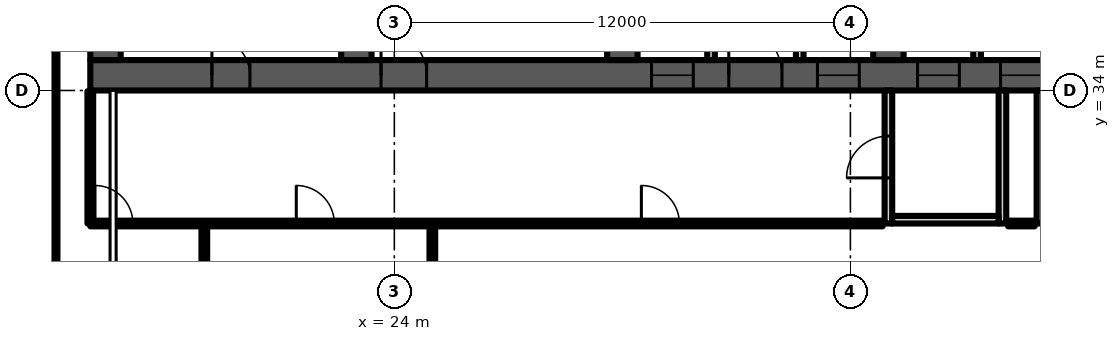
"""IFC4 building model, lengths in metres.
Left out: names, types, materials, properties, quantities, classifications, styles, units other than length and angle.
Written with IfcOpenShell. Run it as: python <this file> out.ifc"""

import sys

from ifc_helpers import new_model, si_unit, direction, frame, frame_2d, origin, place, context, subcontext, project, spatial, polyline, rectangle, outline, extrude, element, fill, save


model = new_model("IFC4")
c1 = context("Model", 3, precision=1e-05, world=origin(), true_north=direction((0.0, 1.0)))
c2 = subcontext(c1, "Body", "Model", "MODEL_VIEW")
j1 = project(units=[si_unit("LENGTHUNIT", "METRE"), si_unit("PLANEANGLEUNIT", "RADIAN")], contexts=[c1])
p1 = place(None, origin())
s1 = spatial("IfcSite", under=j1, at=p1, CompositionType="ELEMENT")
p2 = place(p1, origin())
s2 = spatial("IfcBuilding", under=s1, at=p2, CompositionType="ELEMENT")
p3 = place(p2, frame((0.0, 0.0, 202.3)))
s3 = spatial("IfcBuildingStorey", under=s2, at=p3, CompositionType="ELEMENT", Elevation=202.3)
p4 = place(p3, frame((16.0, 34.4, 0.0), z_axis=(0.0, 0.0, 1.0), x_axis=(1.0, 0.0, 0.0)))
e1 = element("IfcWall", 1, at=p4, inside=s3, PredefinedType="SHEAR", context=c2, shape_type="SweptSolid", body=[
    extrude(rectangle(XDim=42.0, YDim=0.8, at=frame_2d((21.0, 0.0))), origin(), (0.0, 0.0, 1.0), 4.8),
])
p5 = place(p4, frame((3.2, 0.0, 0.0)))
e2 = element("IfcOpeningElement", 2, at=p5, cuts=e1, PredefinedType="OPENING", context=c2, shape_type="SweptSolid", body=[
    extrude(rectangle(XDim=1.0, YDim=2.1, at=frame_2d((0.5, 1.05))), frame((0.0, 0.41, 0.0), z_axis=(0.0, -1.0, 0.0), x_axis=(1.0, 0.0, 0.0)), (0.0, 0.0, 1.0), 0.82),
])
p6 = place(p4, frame((7.65, 0.0, 0.0)))
e3 = element("IfcOpeningElement", 3, at=p6, cuts=e1, PredefinedType="OPENING", context=c2, shape_type="SweptSolid", body=[
    extrude(rectangle(XDim=1.2, YDim=2.1, at=frame_2d((0.6, 1.05))), frame((0.0, 0.41, 0.0), z_axis=(0.0, -1.0, 0.0), x_axis=(1.0, 0.0, 0.0)), (0.0, 0.0, 1.0), 0.82),
])
p7 = place(p4, frame((14.767, 0.0, 0.0)))
e4 = element("IfcOpeningElement", 4, at=p7, cuts=e1, PredefinedType="OPENING", context=c2, shape_type="SweptSolid", body=[
    extrude(rectangle(XDim=1.1, YDim=2.1, at=frame_2d((0.55, 1.05))), frame((0.0, 0.41, 0.0), z_axis=(0.0, -1.0, 0.0), x_axis=(1.0, 0.0, 0.0)), (0.0, 0.0, 1.0), 0.82),
])
p8 = place(p4, frame((19.133, 0.0, 0.0)))
e5 = element("IfcOpeningElement", 5, at=p8, cuts=e1, PredefinedType="OPENING", context=c2, shape_type="SweptSolid", body=[
    extrude(rectangle(XDim=1.1, YDim=2.1, at=frame_2d((0.55, 1.05))), frame((0.0, 0.41, 0.0), z_axis=(0.0, -1.0, 0.0), x_axis=(1.0, 0.0, 0.0)), (0.0, 0.0, 1.0), 0.82),
])
p9 = place(p4, frame((16.8, 0.0, 0.0)))
e6 = element("IfcOpeningElement", 6, at=p9, cuts=e1, PredefinedType="OPENING", context=c2, shape_type="SweptSolid", body=[
    extrude(rectangle(XDim=1.4, YDim=2.1, at=frame_2d((0.7, 1.05))), frame((0.0, 0.41, 0.0), z_axis=(0.0, -1.0, 0.0), x_axis=(1.0, 0.0, 0.0)), (0.0, 0.0, 1.0), 0.82),
])
p10 = place(p4, frame((21.767, 0.0, 0.0)))
e7 = element("IfcOpeningElement", 7, at=p10, cuts=e1, PredefinedType="OPENING", context=c2, shape_type="SweptSolid", body=[
    extrude(rectangle(XDim=1.1, YDim=2.1, at=frame_2d((0.55, 1.05))), frame((0.0, 0.41, 0.0), z_axis=(0.0, -1.0, 0.0), x_axis=(1.0, 0.0, 0.0)), (0.0, 0.0, 1.0), 0.82),
])
p11 = place(p4, frame((23.95, 0.0, 0.0)))
e8 = element("IfcOpeningElement", 8, at=p11, cuts=e1, PredefinedType="OPENING", context=c2, shape_type="SweptSolid", body=[
    extrude(rectangle(XDim=1.1, YDim=2.1, at=frame_2d((0.55, 1.05))), frame((0.0, 0.41, 0.0), z_axis=(0.0, -1.0, 0.0), x_axis=(1.0, 0.0, 0.0)), (0.0, 0.0, 1.0), 0.82),
])
p12 = place(p4, frame((26.133, 0.0, 0.0)))
e9 = element("IfcOpeningElement", 9, at=p12, cuts=e1, PredefinedType="OPENING", context=c2, shape_type="SweptSolid", body=[
    extrude(rectangle(XDim=1.1, YDim=2.1, at=frame_2d((0.55, 1.05))), frame((0.0, 0.41, 0.0), z_axis=(0.0, -1.0, 0.0), x_axis=(1.0, 0.0, 0.0)), (0.0, 0.0, 1.0), 0.82),
])
p13 = place(p4, frame((33.15, 0.0, 0.0)))
e10 = element("IfcOpeningElement", 10, at=p13, cuts=e1, PredefinedType="OPENING", context=c2, shape_type="SweptSolid", body=[
    extrude(rectangle(XDim=1.2, YDim=2.1, at=frame_2d((0.6, 1.05))), frame((0.0, 0.41, 0.0), z_axis=(0.0, -1.0, 0.0), x_axis=(1.0, 0.0, 0.0)), (0.0, 0.0, 1.0), 0.82),
])
p14 = place(p4, frame((37.767, 0.0, 0.0)))
e11 = element("IfcOpeningElement", 11, at=p14, cuts=e1, PredefinedType="OPENING", context=c2, shape_type="SweptSolid", body=[
    extrude(rectangle(XDim=1.4, YDim=2.1, at=frame_2d((0.7, 1.05))), frame((0.0, 0.41, 0.0), z_axis=(0.0, -1.0, 0.0), x_axis=(1.0, 0.0, 0.0)), (0.0, 0.0, 1.0), 0.82),
])
p15 = place(p3, frame((16.4, 34.8, 0.0), z_axis=(0.0, 0.0, 1.0), x_axis=(0.0, 1.0, 0.0)))
e12 = element("IfcWall", 12, at=p15, inside=s3, PredefinedType="SHEAR", context=c2, shape_type="SweptSolid", body=[
    extrude(rectangle(XDim=13.184, YDim=0.8, at=frame_2d((6.592, 0.0))), origin(), (0.0, 0.0, 1.0), 4.8),
])
p16 = place(p3, frame((23.0, 34.8, 0.0), z_axis=(0.0, 0.0, 1.0), x_axis=(0.0, 1.0, 0.0)))
e13 = element("IfcWall", 13, at=p16, inside=s3, PredefinedType="SHEAR", context=c2, shape_type="SweptSolid", body=[
    extrude(rectangle(XDim=13.762, YDim=0.8, at=frame_2d((6.881, 0.0))), origin(), (0.0, 0.0, 1.0), 4.8),
])
p17 = place(p16, frame((2.55, 0.0, 0.0)))
e14 = element("IfcOpeningElement", 14, at=p17, cuts=e13, PredefinedType="OPENING", context=c2, shape_type="SweptSolid", body=[
    extrude(rectangle(XDim=1.1, YDim=2.1, at=frame_2d((0.55, 1.05))), frame((0.0, 0.41, 0.0), z_axis=(0.0, -1.0, 0.0), x_axis=(1.0, 0.0, 0.0)), (0.0, 0.0, 1.0), 0.82),
])
p18 = place(p16, frame((10.0, 0.0, 0.0)))
e15 = element("IfcOpeningElement", 15, at=p18, cuts=e13, PredefinedType="OPENING", context=c2, shape_type="SweptSolid", body=[
    extrude(rectangle(XDim=1.0, YDim=2.1, at=frame_2d((0.5, 1.05))), frame((0.0, 0.41, 0.0), z_axis=(0.0, -1.0, 0.0), x_axis=(1.0, 0.0, 0.0)), (0.0, 0.0, 1.0), 0.82),
])
p19 = place(p3, frame((30.0, 34.8, 0.0), z_axis=(0.0, 0.0, 1.0), x_axis=(0.0, 1.0, 0.0)))
e16 = element("IfcWall", 16, at=p19, inside=s3, PredefinedType="SHEAR", context=c2, shape_type="SweptSolid", body=[
    extrude(rectangle(XDim=14.374, YDim=0.8, at=frame_2d((7.187, 0.0))), origin(), (0.0, 0.0, 1.0), 4.8),
])
p20 = place(p19, frame((3.6, 0.0, 0.0)))
e17 = element("IfcOpeningElement", 17, at=p20, cuts=e16, PredefinedType="OPENING", context=c2, shape_type="SweptSolid", body=[
    extrude(rectangle(XDim=1.1, YDim=2.1, at=frame_2d((0.55, 1.05))), frame((0.0, 0.41, 0.0), z_axis=(0.0, -1.0, 0.0), x_axis=(1.0, 0.0, 0.0)), (0.0, 0.0, 1.0), 0.82),
])
p21 = place(p3, frame((37.0, 34.8, 0.0), z_axis=(0.0, 0.0, 1.0), x_axis=(0.0, 1.0, 0.0)))
e18 = element("IfcWall", 18, at=p21, inside=s3, PredefinedType="SHEAR", context=c2, shape_type="SweptSolid", body=[
    extrude(rectangle(XDim=14.987, YDim=0.8, at=frame_2d((7.493, 0.0))), origin(), (0.0, 0.0, 1.0), 4.8),
])
p22 = place(p21, frame((11.312, 0.0, 0.0)))
e19 = element("IfcOpeningElement", 19, at=p22, cuts=e18, PredefinedType="OPENING", context=c2, shape_type="SweptSolid", body=[
    extrude(rectangle(XDim=1.0, YDim=2.1, at=frame_2d((0.5, 1.05))), frame((0.0, 0.41, 0.0), z_axis=(0.0, -1.0, 0.0), x_axis=(1.0, 0.0, 0.0)), (0.0, 0.0, 1.0), 0.82),
])
p23 = place(p21, frame((3.6, 0.0, 0.0)))
e20 = element("IfcOpeningElement", 20, at=p23, cuts=e18, PredefinedType="OPENING", context=c2, shape_type="SweptSolid", body=[
    extrude(rectangle(XDim=1.1, YDim=2.1, at=frame_2d((0.55, 1.05))), frame((0.0, 0.41, 0.0), z_axis=(0.0, -1.0, 0.0), x_axis=(1.0, 0.0, 0.0)), (0.0, 0.0, 1.0), 0.82),
])
p24 = place(p3, frame((0.0, 0.0, -0.0)))
e21 = element("IfcWall", 21, at=p24, inside=s3, PredefinedType="PARTITIONING", context=c2, shape_type="SweptSolid", body=[
    extrude(outline(polyline([(32.233, 37.65), (30.4, 37.65), (30.4, 37.85), (32.233, 37.85), (32.433, 37.85), (32.433, 34.8), (32.233, 34.8), (32.233, 37.65)])), origin(), (0.0, 0.0, 1.0), 4.4),
])
p25 = place(p3, frame((0.0, 0.0, -0.0)))
e22 = element("IfcWall", 22, at=p25, inside=s3, PredefinedType="PARTITIONING", context=c2, shape_type="SweptSolid", body=[
    extrude(outline(polyline([(34.567, 37.85), (34.767, 37.85), (36.6, 37.85), (36.6, 37.65), (34.767, 37.65), (34.767, 34.8), (34.567, 34.8), (34.567, 37.85)])), origin(), (0.0, 0.0, 1.0), 4.4),
])
p26 = place(p3, frame((0.0, 0.0, -0.0)))
e23 = element("IfcWall", 23, at=p26, inside=s3, PredefinedType="PARTITIONING", context=c2, shape_type="SweptSolid", body=[
    extrude(outline(polyline([(41.567, 37.1), (39.433, 37.1), (39.433, 34.8), (39.233, 34.8), (39.233, 37.65), (37.4, 37.65), (37.4, 37.85), (39.233, 37.85), (39.433, 37.85), (39.433, 37.3), (41.567, 37.3), (41.567, 37.55), (41.767, 37.55), (43.6, 37.55), (43.6, 37.35), (41.767, 37.35), (41.767, 34.8), (41.567, 34.8), (41.567, 37.1)])), origin(), (0.0, 0.0, 1.0), 4.4),
])
p27 = place(p3, frame((37.0, 30.5, 0.0), z_axis=(0.0, 0.0, 1.0), x_axis=(0.0, 1.0, 0.0)))
e24 = element("IfcWall", 24, at=p27, inside=s3, PredefinedType="PARTITIONING", context=c2, shape_type="SweptSolid", body=[
    extrude(rectangle(XDim=3.5, YDim=0.2, at=frame_2d((1.75, 0.0))), origin(), (0.0, 0.0, 1.0), 4.4),
])
p28 = place(p27, frame((1.2, 0.0, 0.0)))
e25 = element("IfcOpeningElement", 25, at=p28, cuts=e24, PredefinedType="OPENING", context=c2, shape_type="SweptSolid", body=[
    extrude(rectangle(XDim=1.1, YDim=2.1, at=frame_2d((0.55, 1.05))), frame((0.0, 0.11, 0.0), z_axis=(0.0, -1.0, 0.0), x_axis=(1.0, 0.0, 0.0)), (0.0, 0.0, 1.0), 0.22),
])
p29 = place(p3, frame((40.0, 30.5, 0.0), z_axis=(0.0, 0.0, 1.0), x_axis=(0.0, 1.0, 0.0)))
e26 = element("IfcWall", 26, at=p29, inside=s3, PredefinedType="PARTITIONING", context=c2, shape_type="SweptSolid", body=[
    extrude(rectangle(XDim=3.5, YDim=0.2, at=frame_2d((1.75, 0.0))), origin(), (0.0, 0.0, 1.0), 4.4),
])
p30 = place(p3, frame((37.1, 30.6, 0.0), z_axis=(0.0, 0.0, 1.0), x_axis=(1.0, 0.0, 0.0)))
e27 = element("IfcWall", 27, at=p30, inside=s3, PredefinedType="PARTITIONING", context=c2, shape_type="SweptSolid", body=[
    extrude(rectangle(XDim=2.8, YDim=0.2, at=frame_2d((1.4, 0.0))), origin(), (0.0, 0.0, 1.0), 4.4),
])
p31 = place(p3, frame((41.0, 30.5, 0.0), z_axis=(0.0, 0.0, 1.0), x_axis=(0.0, 1.0, 0.0)))
e28 = element("IfcWall", 28, at=p31, inside=s3, PredefinedType="PARTITIONING", context=c2, shape_type="SweptSolid", body=[
    extrude(rectangle(XDim=3.5, YDim=0.2, at=frame_2d((1.75, 0.0))), origin(), (0.0, 0.0, 1.0), 4.4),
])
p32 = place(p3, frame((15.06, 27.56, 0.0), z_axis=(0.0, 0.0, 1.0), x_axis=(0.0, 1.0, 0.0)))
e29 = element("IfcWall", 29, at=p32, inside=s3, PredefinedType="PARTITIONING", context=c2, shape_type="SweptSolid", body=[
    extrude(rectangle(XDim=13.886, YDim=0.15, at=frame_2d((6.943, 0.0))), origin(), (0.0, 0.0, 1.0), 4.4),
])
p33 = place(p3, frame((16.0, 30.5, 0.0), z_axis=(0.0, 0.0, 1.0), x_axis=(0.0, 1.0, 0.0)))
e30 = element("IfcWall", 30, at=p33, inside=s3, PredefinedType="PARTITIONING", context=c2, shape_type="SweptSolid", body=[
    extrude(rectangle(XDim=3.48, YDim=0.15, at=frame_2d((1.74, 0.0))), origin(), (0.0, 0.0, 1.0), 4.4),
])
p34 = place(p3, frame((16.0, 30.5, 0.0), z_axis=(0.0, 0.0, 1.0), x_axis=(1.0, 0.0, 0.0)))
e31 = element("IfcWall", 31, at=p34, inside=s3, PredefinedType="PARTITIONING", context=c2, shape_type="SweptSolid", body=[
    extrude(rectangle(XDim=20.85, YDim=0.15, at=frame_2d((10.425, 0.0))), origin(), (0.0, 0.0, 1.0), 4.4),
])
p35 = place(p34, frame((0.12, 0.0, 0.0)))
e32 = element("IfcOpeningElement", 32, at=p35, cuts=e31, PredefinedType="OPENING", context=c2, shape_type="SweptSolid", body=[
    extrude(rectangle(XDim=1.0, YDim=2.1, at=frame_2d((0.5, 1.05))), frame((0.0, 0.085, 0.0), z_axis=(0.0, -1.0, 0.0), x_axis=(1.0, 0.0, 0.0)), (0.0, 0.0, 1.0), 0.17),
])
p36 = place(p34, frame((5.42, 0.0, 0.0)))
e33 = element("IfcOpeningElement", 33, at=p36, cuts=e31, PredefinedType="OPENING", context=c2, shape_type="SweptSolid", body=[
    extrude(rectangle(XDim=1.0, YDim=2.1, at=frame_2d((0.5, 1.05))), frame((0.0, 0.085, 0.0), z_axis=(0.0, -1.0, 0.0), x_axis=(1.0, 0.0, 0.0)), (0.0, 0.0, 1.0), 0.17),
])
p37 = place(p34, frame((14.5, 0.0, 0.0)))
e34 = element("IfcOpeningElement", 34, at=p37, cuts=e31, PredefinedType="OPENING", context=c2, shape_type="SweptSolid", body=[
    extrude(rectangle(XDim=1.0, YDim=2.1, at=frame_2d((0.5, 1.05))), frame((0.0, 0.085, 0.0), z_axis=(0.0, -1.0, 0.0), x_axis=(1.0, 0.0, 0.0)), (0.0, 0.0, 1.0), 0.17),
])
p38 = place(p3, frame((19.0, 25.095, 0.0), z_axis=(0.0, 0.0, 1.0), x_axis=(0.0, 1.0, 0.0)))
e35 = element("IfcWall", 35, at=p38, inside=s3, PredefinedType="PARTITIONING", context=c2, shape_type="SweptSolid", body=[
    extrude(rectangle(XDim=5.405, YDim=0.15, at=frame_2d((2.703, 0.0))), origin(), (0.0, 0.0, 1.0), 4.4),
])
p39 = place(p3, frame((25.0, 23.25, 0.0), z_axis=(0.0, 0.0, 1.0), x_axis=(0.0, 1.0, 0.0)))
e36 = element("IfcWall", 36, at=p39, inside=s3, PredefinedType="PARTITIONING", context=c2, shape_type="SweptSolid", body=[
    extrude(rectangle(XDim=7.25, YDim=0.15, at=frame_2d((3.625, 0.0))), origin(), (0.0, 0.0, 1.0), 4.4),
])
p40 = place(p3, frame((40.15, 30.5, 0.0), z_axis=(0.0, 0.0, 1.0), x_axis=(1.0, 0.0, 0.0)))
e37 = element("IfcWall", 37, at=p40, inside=s3, PredefinedType="PARTITIONING", context=c2, shape_type="SweptSolid", body=[
    extrude(rectangle(XDim=0.7, YDim=0.15, at=frame_2d((0.35, 0.0))), origin(), (0.0, 0.0, 1.0), 4.4),
])
p41 = place(p5, origin())
e38 = element("IfcDoor", 38, at=p41, inside=s3, OperationType="SINGLE_SWING_LEFT", PredefinedType="DOOR", context=c2, shape_type="SweptSolid", body=[
    extrude(rectangle(XDim=1.0, YDim=2.1, at=frame_2d((0.5, 1.05))), frame((0.0, 0.4, 0.0), z_axis=(0.0, -1.0, 0.0), x_axis=(1.0, 0.0, 0.0)), (0.0, 0.0, 1.0), 0.8),
])
fill(e2, e38)
p42 = place(p6, origin())
e39 = element("IfcDoor", 39, at=p42, inside=s3, OperationType="SINGLE_SWING_LEFT", PredefinedType="DOOR", context=c2, shape_type="SweptSolid", body=[
    extrude(rectangle(XDim=1.2, YDim=2.1, at=frame_2d((0.6, 1.05))), frame((0.0, 0.025, 0.0), z_axis=(0.0, -1.0, 0.0), x_axis=(1.0, 0.0, 0.0)), (0.0, 0.0, 1.0), 0.05),
])
fill(e3, e39)
p43 = place(p7, origin())
e40 = element("IfcDoor", 40, at=p43, inside=s3, OperationType="DOUBLE_DOOR_SLIDING", PredefinedType="DOOR", context=c2, shape_type="SweptSolid", body=[
    extrude(rectangle(XDim=1.1, YDim=2.1, at=frame_2d((0.55, 1.05))), frame((0.0, 0.025, 0.0), z_axis=(0.0, -1.0, 0.0), x_axis=(1.0, 0.0, 0.0)), (0.0, 0.0, 1.0), 0.05),
])
fill(e4, e40)
p44 = place(p8, origin())
e41 = element("IfcDoor", 41, at=p44, inside=s3, OperationType="DOUBLE_DOOR_SLIDING", PredefinedType="DOOR", context=c2, shape_type="SweptSolid", body=[
    extrude(rectangle(XDim=1.1, YDim=2.1, at=frame_2d((0.55, 1.05))), frame((0.0, 0.025, 0.0), z_axis=(0.0, -1.0, 0.0), x_axis=(1.0, 0.0, 0.0)), (0.0, 0.0, 1.0), 0.05),
])
fill(e5, e41)
p45 = place(p9, origin())
e42 = element("IfcDoor", 42, at=p45, inside=s3, OperationType="DOUBLE_DOOR_SINGLE_SWING", PredefinedType="DOOR", context=c2, shape_type="SweptSolid", body=[
    extrude(rectangle(XDim=1.4, YDim=2.1, at=frame_2d((0.7, 1.05))), frame((0.0, 0.025, 0.0), z_axis=(0.0, -1.0, 0.0), x_axis=(1.0, 0.0, 0.0)), (0.0, 0.0, 1.0), 0.05),
])
fill(e6, e42)
p46 = place(p10, origin())
e43 = element("IfcDoor", 43, at=p46, inside=s3, OperationType="DOUBLE_DOOR_SLIDING", PredefinedType="DOOR", context=c2, shape_type="SweptSolid", body=[
    extrude(rectangle(XDim=1.1, YDim=2.1, at=frame_2d((0.55, 1.05))), frame((0.0, 0.025, 0.0), z_axis=(0.0, -1.0, 0.0), x_axis=(1.0, 0.0, 0.0)), (0.0, 0.0, 1.0), 0.05),
])
fill(e7, e43)
p47 = place(p11, origin())
e44 = element("IfcDoor", 44, at=p47, inside=s3, OperationType="DOUBLE_DOOR_SLIDING", PredefinedType="DOOR", context=c2, shape_type="SweptSolid", body=[
    extrude(rectangle(XDim=1.1, YDim=2.1, at=frame_2d((0.55, 1.05))), frame((0.0, 0.025, 0.0), z_axis=(0.0, -1.0, 0.0), x_axis=(1.0, 0.0, 0.0)), (0.0, 0.0, 1.0), 0.05),
])
fill(e8, e44)
p48 = place(p28, origin())
e45 = element("IfcDoor", 45, at=p48, inside=s3, OperationType="SINGLE_SWING_LEFT", PredefinedType="DOOR", context=c2, shape_type="SweptSolid", body=[
    extrude(rectangle(XDim=1.1, YDim=2.1, at=frame_2d((0.55, 1.05))), frame((0.0, 0.025, 0.0), z_axis=(0.0, -1.0, 0.0), x_axis=(1.0, 0.0, 0.0)), (0.0, 0.0, 1.0), 0.05),
])
fill(e25, e45)
p49 = place(p35, origin())
e46 = element("IfcDoor", 46, at=p49, inside=s3, OperationType="SINGLE_SWING_LEFT", PredefinedType="DOOR", context=c2, shape_type="SweptSolid", body=[
    extrude(rectangle(XDim=1.0, YDim=2.1, at=frame_2d((0.5, 1.05))), frame((0.0, 0.025, 0.0), z_axis=(0.0, -1.0, 0.0), x_axis=(1.0, 0.0, 0.0)), (0.0, 0.0, 1.0), 0.05),
])
fill(e32, e46)
p50 = place(p36, origin())
e47 = element("IfcDoor", 47, at=p50, inside=s3, OperationType="SINGLE_SWING_LEFT", PredefinedType="DOOR", context=c2, shape_type="SweptSolid", body=[
    extrude(rectangle(XDim=1.0, YDim=2.1, at=frame_2d((0.5, 1.05))), frame((0.0, 0.025, 0.0), z_axis=(0.0, -1.0, 0.0), x_axis=(1.0, 0.0, 0.0)), (0.0, 0.0, 1.0), 0.05),
])
fill(e33, e47)
p51 = place(p37, origin())
e48 = element("IfcDoor", 48, at=p51, inside=s3, OperationType="SINGLE_SWING_LEFT", PredefinedType="DOOR", context=c2, shape_type="SweptSolid", body=[
    extrude(rectangle(XDim=1.0, YDim=2.1, at=frame_2d((0.5, 1.05))), frame((0.0, 0.025, 0.0), z_axis=(0.0, -1.0, 0.0), x_axis=(1.0, 0.0, 0.0)), (0.0, 0.0, 1.0), 0.05),
])
fill(e34, e48)
save(model, sys.argv[1])
